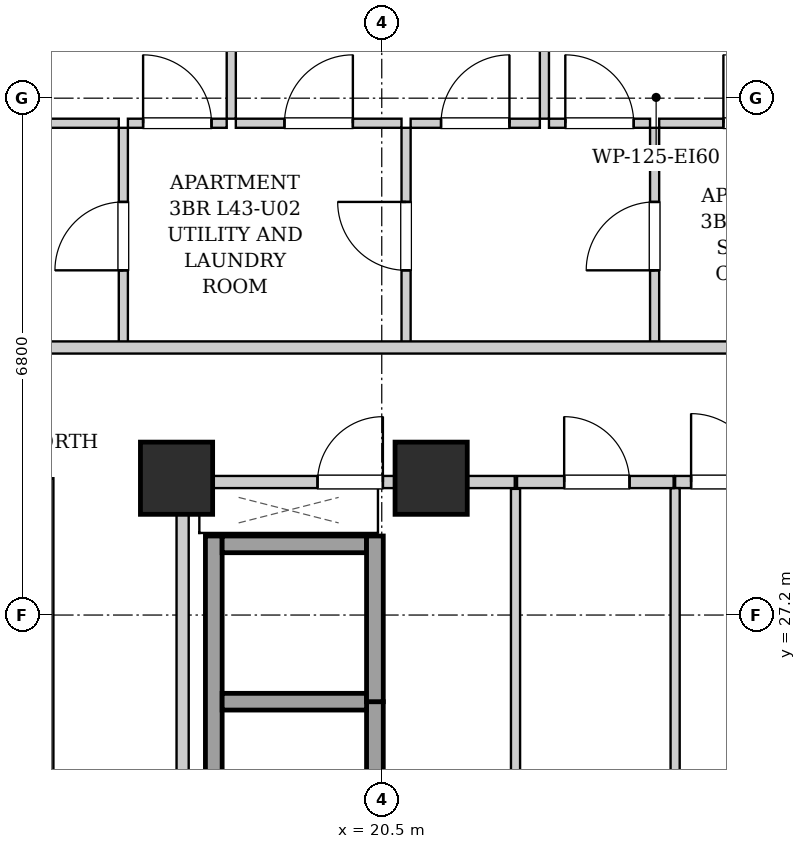
"""IFC4 building model, lengths in metres.
Left out: names, types, materials, properties, quantities, classifications, styles, units other than length and angle.
Written with IfcOpenShell. Run it as: python <this file> out.ifc"""

import sys

from ifc_helpers import new_model, si_unit, direction, frame, frame_2d, origin, origin_2d, place, context, subcontext, project, spatial, rectangle, extrude, element, fill, save


model = new_model("IFC4")
c1 = context("Model", 3, precision=1e-05, world=origin(), true_north=direction((0.0, 1.0)))
c2 = subcontext(c1, "Body", "Model", "MODEL_VIEW")
j1 = project(units=[si_unit("LENGTHUNIT", "METRE"), si_unit("PLANEANGLEUNIT", "RADIAN")], contexts=[c1])
p1 = place(None, origin())
s1 = spatial("IfcSite", under=j1, at=p1, CompositionType="ELEMENT")
p2 = place(p1, origin())
s2 = spatial("IfcBuilding", under=s1, at=p2, CompositionType="ELEMENT")
p3 = place(p2, frame((0.0, 0.0, 150.4)))
s3 = spatial("IfcBuildingStorey", under=s2, at=p3, CompositionType="ELEMENT", Elevation=150.4)
for number, where, z_axis, x_axis in (
    (1, (17.8, 29.0, 0.0), (0.0, 0.0, 1.0), (1.0, 0.0, 0.0)),
    (2, (21.15, 29.0, 0.0), (0.0, 0.0, 1.0), (1.0, 0.0, 0.0)),
):
    element("IfcColumn", number, at=place(p3, frame(where, z_axis=z_axis, x_axis=x_axis)), inside=s3, PredefinedType="COLUMN", context=c2, shape_type="SweptSolid", body=[
        extrude(rectangle(XDim=0.95, YDim=0.95, at=origin_2d()), origin(), (0.0, 0.0, 1.0), 3.25),
    ])
p4 = place(p3, frame((18.29, 24.1, 0.0), z_axis=(0.0, 0.0, 1.0), x_axis=(0.0, 1.0, 0.0)))
e3 = element("IfcWall", 3, at=p4, inside=s3, PredefinedType="SHEAR", context=c2, shape_type="SweptSolid", body=[
    extrude(rectangle(XDim=4.14, YDim=0.22, at=frame_2d((2.07, 0.0))), origin(), (0.0, 0.0, 1.0), 2.99),
])
p5 = place(p3, frame((20.41, 24.1, 0.0), z_axis=(0.0, 0.0, 1.0), x_axis=(0.0, 1.0, 0.0)))
e4 = element("IfcWall", 4, at=p5, inside=s3, PredefinedType="SHEAR", context=c2, shape_type="SweptSolid", body=[
    extrude(rectangle(XDim=1.96, YDim=0.22, at=frame_2d((0.98, 0.0))), origin(), (0.0, 0.0, 1.0), 2.99),
])
for number, where, z_axis, x_axis in (
    (5, (18.4, 26.06, 0.0), (0.0, 0.0, 1.0), (1.0, 0.0, 0.0)),
    (6, (18.4, 28.13, 0.0), (0.0, 0.0, 1.0), (1.0, 0.0, 0.0)),
):
    element("IfcWall", number, at=place(p3, frame(where, z_axis=z_axis, x_axis=x_axis)), inside=s3, PredefinedType="SHEAR", context=c2, shape_type="SweptSolid", body=[
        extrude(rectangle(XDim=1.9, YDim=0.22, at=frame_2d((0.95, 0.0))), origin(), (0.0, 0.0, 1.0), 2.99),
    ])
p6 = place(p3, frame((20.41, 26.06, 0.0), z_axis=(0.0, 0.0, 1.0), x_axis=(0.0, 1.0, 0.0)))
e7 = element("IfcWall", 7, at=p6, inside=s3, PredefinedType="SHEAR", context=c2, shape_type="SweptSolid", body=[
    extrude(rectangle(XDim=2.18, YDim=0.22, at=frame_2d((1.09, 0.0))), origin(), (0.0, 0.0, 1.0), 2.99),
])
p7 = place(p3, frame((17.88, 24.12, 0.0), z_axis=(0.0, 0.0, 1.0), x_axis=(0.0, 1.0, 0.0)))
e8 = element("IfcWall", 8, at=p7, inside=s3, PredefinedType="PARTITIONING", context=c2, shape_type="SweptSolid", body=[
    extrude(rectangle(XDim=4.76, YDim=0.16, at=frame_2d((2.38, 0.0))), origin(), (0.0, 0.0, 1.0), 2.99),
])
p8 = place(p3, frame((24.36, 28.95, 0.0), z_axis=(0.0, 0.0, 1.0), x_axis=(1.0, 0.0, 0.0)))
e9 = element("IfcWall", 9, at=p8, inside=s3, PredefinedType="PARTITIONING", context=c2, shape_type="SweptSolid", body=[
    extrude(rectangle(XDim=1.32, YDim=0.16, at=frame_2d((0.66, 0.0))), origin(), (0.0, 0.0, 1.0), 2.442),
])
p9 = place(p8, frame((0.21, 0.0, 0.0)))
e10 = element("IfcOpeningElement", 10, at=p9, cuts=e9, PredefinedType="OPENING", context=c2, shape_type="SweptSolid", body=[
    extrude(rectangle(XDim=0.9, YDim=2.05, at=frame_2d((0.45, 1.025))), frame((0.0, 0.09, 0.0), z_axis=(0.0, -1.0, 0.0), x_axis=(1.0, 0.0, 0.0)), (0.0, 0.0, 1.0), 0.18),
])
p10 = place(p3, frame((17.96, 28.95, 0.0), z_axis=(0.0, 0.0, 1.0), x_axis=(1.0, 0.0, 0.0)))
e11 = element("IfcWall", 11, at=p10, inside=s3, PredefinedType="PARTITIONING", context=c2, shape_type="SweptSolid", body=[
    extrude(rectangle(XDim=4.29, YDim=0.16, at=frame_2d((2.145, 0.0))), origin(), (0.0, 0.0, 1.0), 2.442),
])
p11 = place(p10, frame((1.695, 0.0, 0.0)))
e12 = element("IfcOpeningElement", 12, at=p11, cuts=e11, PredefinedType="OPENING", context=c2, shape_type="SweptSolid", body=[
    extrude(rectangle(XDim=0.86, YDim=2.05, at=frame_2d((0.43, 1.025))), frame((0.0, 0.09, 0.0), z_axis=(0.0, -1.0, 0.0), x_axis=(1.0, 0.0, 0.0)), (0.0, 0.0, 1.0), 0.18),
])
p12 = place(p3, frame((24.36, 25.0, 0.0), z_axis=(0.0, 0.0, 1.0), x_axis=(0.0, 1.0, 0.0)))
e13 = element("IfcWall", 13, at=p12, inside=s3, PredefinedType="PARTITIONING", context=c2, shape_type="SweptSolid", body=[
    extrude(rectangle(XDim=3.87, YDim=0.12, at=frame_2d((1.935, 0.0))), origin(), (0.0, 0.0, 1.0), 2.99),
])
p13 = place(p3, frame((22.26, 25.0, 0.0), z_axis=(0.0, 0.0, 1.0), x_axis=(0.0, 1.0, 0.0)))
e14 = element("IfcWall", 14, at=p13, inside=s3, PredefinedType="PARTITIONING", context=c2, shape_type="SweptSolid", body=[
    extrude(rectangle(XDim=3.86, YDim=0.12, at=frame_2d((1.93, 0.0))), origin(), (0.0, 0.0, 1.0), 2.99),
])
p14 = place(p3, frame((22.28, 28.95, 0.0), z_axis=(0.0, 0.0, 1.0), x_axis=(1.0, 0.0, 0.0)))
e15 = element("IfcWall", 15, at=p14, inside=s3, PredefinedType="PARTITIONING", context=c2, shape_type="SweptSolid", body=[
    extrude(rectangle(XDim=2.06, YDim=0.16, at=frame_2d((1.03, 0.0))), origin(), (0.0, 0.0, 1.0), 2.442),
])
p15 = place(p14, frame((0.62, 0.0, 0.0)))
e16 = element("IfcOpeningElement", 16, at=p15, cuts=e15, PredefinedType="OPENING", context=c2, shape_type="SweptSolid", body=[
    extrude(rectangle(XDim=0.86, YDim=2.05, at=frame_2d((0.43, 1.025))), frame((0.0, 0.09, 0.0), z_axis=(0.0, -1.0, 0.0), x_axis=(1.0, 0.0, 0.0)), (0.0, 0.0, 1.0), 0.18),
])
p16 = place(p3, frame((17.1, 30.76, 0.0), z_axis=(0.0, 0.0, 1.0), x_axis=(0.0, 1.0, 0.0)))
e17 = element("IfcWall", 17, at=p16, inside=s3, PredefinedType="PARTITIONING", context=c2, shape_type="SweptSolid", body=[
    extrude(rectangle(XDim=2.85, YDim=0.12, at=frame_2d((1.425, 0.0))), origin(), (0.0, 0.0, 1.0), 2.99),
])
p17 = place(p16, frame((0.975, 0.0, 0.0)))
e18 = element("IfcOpeningElement", 18, at=p17, cuts=e17, PredefinedType="OPENING", context=c2, shape_type="SweptSolid", body=[
    extrude(rectangle(XDim=0.9, YDim=2.05, at=frame_2d((0.45, 1.025))), frame((0.0, 0.07, 0.0), z_axis=(0.0, -1.0, 0.0), x_axis=(1.0, 0.0, 0.0)), (0.0, 0.0, 1.0), 0.14),
])
p18 = place(p3, frame((14.26, 33.67, 0.0), z_axis=(0.0, 0.0, 1.0), x_axis=(1.0, 0.0, 0.0)))
e19 = element("IfcWall", 19, at=p18, inside=s3, PredefinedType="PARTITIONING", context=c2, shape_type="SweptSolid", body=[
    extrude(rectangle(XDim=2.78, YDim=0.12, at=frame_2d((1.39, 0.0))), origin(), (0.0, 0.0, 1.0), 2.99),
])
p19 = place(p18, frame((0.94, 0.0, 0.0)))
e20 = element("IfcOpeningElement", 20, at=p19, cuts=e19, PredefinedType="OPENING", context=c2, shape_type="SweptSolid", body=[
    extrude(rectangle(XDim=0.9, YDim=2.05, at=frame_2d((0.45, 1.025))), frame((0.0, 0.07, 0.0), z_axis=(0.0, -1.0, 0.0), x_axis=(1.0, 0.0, 0.0)), (0.0, 0.0, 1.0), 0.14),
])
p20 = place(p3, frame((20.82, 30.76, 0.0), z_axis=(0.0, 0.0, 1.0), x_axis=(0.0, 1.0, 0.0)))
e21 = element("IfcWall", 21, at=p20, inside=s3, PredefinedType="PARTITIONING", context=c2, shape_type="SweptSolid", body=[
    extrude(rectangle(XDim=2.85, YDim=0.12, at=frame_2d((1.425, 0.0))), origin(), (0.0, 0.0, 1.0), 2.99),
])
p21 = place(p20, frame((0.975, 0.0, 0.0)))
e22 = element("IfcOpeningElement", 22, at=p21, cuts=e21, PredefinedType="OPENING", context=c2, shape_type="SweptSolid", body=[
    extrude(rectangle(XDim=0.9, YDim=2.05, at=frame_2d((0.45, 1.025))), frame((0.0, 0.07, 0.0), z_axis=(0.0, -1.0, 0.0), x_axis=(1.0, 0.0, 0.0)), (0.0, 0.0, 1.0), 0.14),
])
p22 = place(p3, frame((17.16, 33.67, 0.0), z_axis=(0.0, 0.0, 1.0), x_axis=(1.0, 0.0, 0.0)))
e23 = element("IfcWall", 23, at=p22, inside=s3, PredefinedType="PARTITIONING", context=c2, shape_type="SweptSolid", body=[
    extrude(rectangle(XDim=1.3, YDim=0.12, at=frame_2d((0.65, 0.0))), origin(), (0.0, 0.0, 1.0), 2.99),
])
p23 = place(p22, frame((0.2, 0.0, 0.0)))
e24 = element("IfcOpeningElement", 24, at=p23, cuts=e23, PredefinedType="OPENING", context=c2, shape_type="SweptSolid", body=[
    extrude(rectangle(XDim=0.9, YDim=2.05, at=frame_2d((0.45, 1.025))), frame((0.0, 0.07, 0.0), z_axis=(0.0, -1.0, 0.0), x_axis=(1.0, 0.0, 0.0)), (0.0, 0.0, 1.0), 0.14),
])
p24 = place(p3, frame((18.58, 33.67, 0.0), z_axis=(0.0, 0.0, 1.0), x_axis=(1.0, 0.0, 0.0)))
e25 = element("IfcWall", 25, at=p24, inside=s3, PredefinedType="PARTITIONING", context=c2, shape_type="SweptSolid", body=[
    extrude(rectangle(XDim=2.18, YDim=0.12, at=frame_2d((1.09, 0.0))), origin(), (0.0, 0.0, 1.0), 2.99),
])
p25 = place(p24, frame((0.64, 0.0, 0.0)))
e26 = element("IfcOpeningElement", 26, at=p25, cuts=e25, PredefinedType="OPENING", context=c2, shape_type="SweptSolid", body=[
    extrude(rectangle(XDim=0.9, YDim=2.05, at=frame_2d((0.45, 1.025))), frame((0.0, 0.07, 0.0), z_axis=(0.0, -1.0, 0.0), x_axis=(1.0, 0.0, 0.0)), (0.0, 0.0, 1.0), 0.14),
])
p26 = place(p3, frame((24.09, 30.76, 0.0), z_axis=(0.0, 0.0, 1.0), x_axis=(0.0, 1.0, 0.0)))
e27 = element("IfcWall", 27, at=p26, inside=s3, PredefinedType="PARTITIONING", context=c2, shape_type="SweptSolid", body=[
    extrude(rectangle(XDim=2.85, YDim=0.12, at=frame_2d((1.425, 0.0))), origin(), (0.0, 0.0, 1.0), 2.99),
])
p27 = place(p26, frame((0.975, 0.0, 0.0)))
e28 = element("IfcOpeningElement", 28, at=p27, cuts=e27, PredefinedType="OPENING", context=c2, shape_type="SweptSolid", body=[
    extrude(rectangle(XDim=0.9, YDim=2.05, at=frame_2d((0.45, 1.025))), frame((0.0, 0.07, 0.0), z_axis=(0.0, -1.0, 0.0), x_axis=(1.0, 0.0, 0.0)), (0.0, 0.0, 1.0), 0.14),
])
p28 = place(p3, frame((20.88, 33.67, 0.0), z_axis=(0.0, 0.0, 1.0), x_axis=(1.0, 0.0, 0.0)))
e29 = element("IfcWall", 29, at=p28, inside=s3, PredefinedType="PARTITIONING", context=c2, shape_type="SweptSolid", body=[
    extrude(rectangle(XDim=1.7, YDim=0.12, at=frame_2d((0.85, 0.0))), origin(), (0.0, 0.0, 1.0), 2.99),
])
p29 = place(p28, frame((0.4, 0.0, 0.0)))
e30 = element("IfcOpeningElement", 30, at=p29, cuts=e29, PredefinedType="OPENING", context=c2, shape_type="SweptSolid", body=[
    extrude(rectangle(XDim=0.9, YDim=2.05, at=frame_2d((0.45, 1.025))), frame((0.0, 0.07, 0.0), z_axis=(0.0, -1.0, 0.0), x_axis=(1.0, 0.0, 0.0)), (0.0, 0.0, 1.0), 0.14),
])
p30 = place(p3, frame((22.7, 33.67, 0.0), z_axis=(0.0, 0.0, 1.0), x_axis=(1.0, 0.0, 0.0)))
e31 = element("IfcWall", 31, at=p30, inside=s3, PredefinedType="PARTITIONING", context=c2, shape_type="SweptSolid", body=[
    extrude(rectangle(XDim=1.33, YDim=0.12, at=frame_2d((0.665, 0.0))), origin(), (0.0, 0.0, 1.0), 2.99),
])
p31 = place(p30, frame((0.215, 0.0, 0.0)))
e32 = element("IfcOpeningElement", 32, at=p31, cuts=e31, PredefinedType="OPENING", context=c2, shape_type="SweptSolid", body=[
    extrude(rectangle(XDim=0.9, YDim=2.05, at=frame_2d((0.45, 1.025))), frame((0.0, 0.07, 0.0), z_axis=(0.0, -1.0, 0.0), x_axis=(1.0, 0.0, 0.0)), (0.0, 0.0, 1.0), 0.14),
])
p32 = place(p3, frame((24.15, 33.67, 0.0), z_axis=(0.0, 0.0, 1.0), x_axis=(1.0, 0.0, 0.0)))
e33 = element("IfcWall", 33, at=p32, inside=s3, PredefinedType="PARTITIONING", context=c2, shape_type="SweptSolid", body=[
    extrude(rectangle(XDim=2.59, YDim=0.12, at=frame_2d((1.295, 0.0))), origin(), (0.0, 0.0, 1.0), 2.99),
])
p33 = place(p32, frame((0.845, 0.0, 0.0)))
e34 = element("IfcOpeningElement", 34, at=p33, cuts=e33, PredefinedType="OPENING", context=c2, shape_type="SweptSolid", body=[
    extrude(rectangle(XDim=0.9, YDim=2.05, at=frame_2d((0.45, 1.025))), frame((0.0, 0.07, 0.0), z_axis=(0.0, -1.0, 0.0), x_axis=(1.0, 0.0, 0.0)), (0.0, 0.0, 1.0), 0.14),
])
p34 = place(p3, frame((18.52, 33.73, 0.0), z_axis=(0.0, 0.0, 1.0), x_axis=(0.0, 1.0, 0.0)))
e35 = element("IfcWall", 35, at=p34, inside=s3, PredefinedType="PARTITIONING", context=c2, shape_type="SweptSolid", body=[
    extrude(rectangle(XDim=9.29, YDim=0.12, at=frame_2d((4.645, 0.0))), origin(), (0.0, 0.0, 1.0), 2.99),
])
p35 = place(p34, frame((4.18, 0.0, 0.0)))
e36 = element("IfcOpeningElement", 36, at=p35, cuts=e35, PredefinedType="OPENING", context=c2, shape_type="SweptSolid", body=[
    extrude(rectangle(XDim=0.9, YDim=2.05, at=frame_2d((0.45, 1.025))), frame((0.0, 0.07, 0.0), z_axis=(0.0, -1.0, 0.0), x_axis=(1.0, 0.0, 0.0)), (0.0, 0.0, 1.0), 0.14),
])
p36 = place(p3, frame((22.64, 33.73, 0.0), z_axis=(0.0, 0.0, 1.0), x_axis=(0.0, 1.0, 0.0)))
e37 = element("IfcWall", 37, at=p36, inside=s3, PredefinedType="PARTITIONING", context=c2, shape_type="SweptSolid", body=[
    extrude(rectangle(XDim=9.29, YDim=0.12, at=frame_2d((4.645, 0.0))), origin(), (0.0, 0.0, 1.0), 2.99),
])
p37 = place(p36, frame((4.18, 0.0, 0.0)))
e38 = element("IfcOpeningElement", 38, at=p37, cuts=e37, PredefinedType="OPENING", context=c2, shape_type="SweptSolid", body=[
    extrude(rectangle(XDim=0.9, YDim=2.05, at=frame_2d((0.45, 1.025))), frame((0.0, 0.07, 0.0), z_axis=(0.0, -1.0, 0.0), x_axis=(1.0, 0.0, 0.0)), (0.0, 0.0, 1.0), 0.14),
])
p38 = place(p3, frame((10.05, 30.72, 0.0), z_axis=(0.0, 0.0, 1.0), x_axis=(1.0, 0.0, 0.0)))
e39 = element("IfcWall", 39, at=p38, inside=s3, PredefinedType="PARTITIONING", context=c2, shape_type="SweptSolid", body=[
    extrude(rectangle(XDim=27.7, YDim=0.16, at=frame_2d((13.85, 0.0))), origin(), (0.0, 0.0, 1.0), 2.99),
])
p39 = place(p38, frame((4.295, 0.0, 0.0)))
e40 = element("IfcOpeningElement", 40, at=p39, cuts=e39, PredefinedType="OPENING", context=c2, shape_type="SweptSolid", body=[
    extrude(rectangle(XDim=0.95, YDim=2.1, at=frame_2d((0.475, 1.05))), frame((0.0, 0.09, 0.0), z_axis=(0.0, -1.0, 0.0), x_axis=(1.0, 0.0, 0.0)), (0.0, 0.0, 1.0), 0.18),
])
p40 = place(p3, frame((16.1, 15.07, 0.0), z_axis=(0.0, 0.0, 1.0), x_axis=(0.0, 1.0, 0.0)))
e41 = element("IfcWall", 41, at=p40, inside=s3, PredefinedType="PARTITIONING", context=c2, shape_type="SweptSolid", body=[
    extrude(rectangle(XDim=13.93, YDim=0.16, at=frame_2d((6.965, 0.0))), origin(), (0.0, 0.0, 1.0), 2.99),
])
p41 = place(p40, frame((4.385, 0.0, 0.0)))
e42 = element("IfcOpeningElement", 42, at=p41, cuts=e41, PredefinedType="OPENING", context=c2, shape_type="SweptSolid", body=[
    extrude(rectangle(XDim=0.95, YDim=2.1, at=frame_2d((0.475, 1.05))), frame((0.0, 0.09, 0.0), z_axis=(0.0, -1.0, 0.0), x_axis=(1.0, 0.0, 0.0)), (0.0, 0.0, 1.0), 0.18),
])
p42 = place(p9, origin())
e43 = element("IfcDoor", 43, at=p42, inside=s3, OperationType="SINGLE_SWING_LEFT", PredefinedType="DOOR", context=c2, shape_type="SweptSolid", body=[
    extrude(rectangle(XDim=0.9, YDim=2.05, at=frame_2d((0.45, 1.025))), frame((0.0, 0.025, 0.0), z_axis=(0.0, -1.0, 0.0), x_axis=(1.0, 0.0, 0.0)), (0.0, 0.0, 1.0), 0.05),
])
fill(e10, e43)
p43 = place(p11, origin())
e44 = element("IfcDoor", 44, at=p43, inside=s3, OperationType="SINGLE_SWING_RIGHT", PredefinedType="DOOR", context=c2, shape_type="SweptSolid", body=[
    extrude(rectangle(XDim=0.86, YDim=2.05, at=frame_2d((0.43, 1.025))), frame((0.0, 0.025, 0.0), z_axis=(0.0, -1.0, 0.0), x_axis=(1.0, 0.0, 0.0)), (0.0, 0.0, 1.0), 0.05),
])
fill(e12, e44)
p44 = place(p15, origin())
e45 = element("IfcDoor", 45, at=p44, inside=s3, OperationType="SINGLE_SWING_LEFT", PredefinedType="DOOR", context=c2, shape_type="SweptSolid", body=[
    extrude(rectangle(XDim=0.86, YDim=2.05, at=frame_2d((0.43, 1.025))), frame((0.0, 0.025, 0.0), z_axis=(0.0, -1.0, 0.0), x_axis=(1.0, 0.0, 0.0)), (0.0, 0.0, 1.0), 0.05),
])
fill(e16, e45)
p45 = place(p17, origin())
e46 = element("IfcDoor", 46, at=p45, inside=s3, OperationType="SINGLE_SWING_LEFT", PredefinedType="DOOR", context=c2, shape_type="SweptSolid", body=[
    extrude(rectangle(XDim=0.9, YDim=2.05, at=frame_2d((0.45, 1.025))), frame((0.0, 0.025, 0.0), z_axis=(0.0, -1.0, 0.0), x_axis=(1.0, 0.0, 0.0)), (0.0, 0.0, 1.0), 0.05),
])
fill(e18, e46)
p46 = place(p21, origin())
e47 = element("IfcDoor", 47, at=p46, inside=s3, OperationType="SINGLE_SWING_RIGHT", PredefinedType="DOOR", context=c2, shape_type="SweptSolid", body=[
    extrude(rectangle(XDim=0.9, YDim=2.05, at=frame_2d((0.45, 1.025))), frame((0.0, 0.025, 0.0), z_axis=(0.0, -1.0, 0.0), x_axis=(1.0, 0.0, 0.0)), (0.0, 0.0, 1.0), 0.05),
])
fill(e22, e47)
p47 = place(p23, origin())
e48 = element("IfcDoor", 48, at=p47, inside=s3, OperationType="SINGLE_SWING_LEFT", PredefinedType="DOOR", context=c2, shape_type="SweptSolid", body=[
    extrude(rectangle(XDim=0.9, YDim=2.05, at=frame_2d((0.45, 1.025))), frame((0.0, 0.025, 0.0), z_axis=(0.0, -1.0, 0.0), x_axis=(1.0, 0.0, 0.0)), (0.0, 0.0, 1.0), 0.05),
])
fill(e24, e48)
p48 = place(p25, origin())
e49 = element("IfcDoor", 49, at=p48, inside=s3, OperationType="SINGLE_SWING_RIGHT", PredefinedType="DOOR", context=c2, shape_type="SweptSolid", body=[
    extrude(rectangle(XDim=0.9, YDim=2.05, at=frame_2d((0.45, 1.025))), frame((0.0, 0.025, 0.0), z_axis=(0.0, -1.0, 0.0), x_axis=(1.0, 0.0, 0.0)), (0.0, 0.0, 1.0), 0.05),
])
fill(e26, e49)
p49 = place(p27, origin())
e50 = element("IfcDoor", 50, at=p49, inside=s3, OperationType="SINGLE_SWING_LEFT", PredefinedType="DOOR", context=c2, shape_type="SweptSolid", body=[
    extrude(rectangle(XDim=0.9, YDim=2.05, at=frame_2d((0.45, 1.025))), frame((0.0, 0.025, 0.0), z_axis=(0.0, -1.0, 0.0), x_axis=(1.0, 0.0, 0.0)), (0.0, 0.0, 1.0), 0.05),
])
fill(e28, e50)
p50 = place(p29, origin())
e51 = element("IfcDoor", 51, at=p50, inside=s3, OperationType="SINGLE_SWING_RIGHT", PredefinedType="DOOR", context=c2, shape_type="SweptSolid", body=[
    extrude(rectangle(XDim=0.9, YDim=2.05, at=frame_2d((0.45, 1.025))), frame((0.0, 0.025, 0.0), z_axis=(0.0, -1.0, 0.0), x_axis=(1.0, 0.0, 0.0)), (0.0, 0.0, 1.0), 0.05),
])
fill(e30, e51)
p51 = place(p31, origin())
e52 = element("IfcDoor", 52, at=p51, inside=s3, OperationType="SINGLE_SWING_LEFT", PredefinedType="DOOR", context=c2, shape_type="SweptSolid", body=[
    extrude(rectangle(XDim=0.9, YDim=2.05, at=frame_2d((0.45, 1.025))), frame((0.0, 0.025, 0.0), z_axis=(0.0, -1.0, 0.0), x_axis=(1.0, 0.0, 0.0)), (0.0, 0.0, 1.0), 0.05),
])
fill(e32, e52)
p52 = place(p33, origin())
e53 = element("IfcDoor", 53, at=p52, inside=s3, OperationType="SINGLE_SWING_LEFT", PredefinedType="DOOR", context=c2, shape_type="SweptSolid", body=[
    extrude(rectangle(XDim=0.9, YDim=2.05, at=frame_2d((0.45, 1.025))), frame((0.0, 0.025, 0.0), z_axis=(0.0, -1.0, 0.0), x_axis=(1.0, 0.0, 0.0)), (0.0, 0.0, 1.0), 0.05),
])
fill(e34, e53)
save(model, sys.argv[1])
